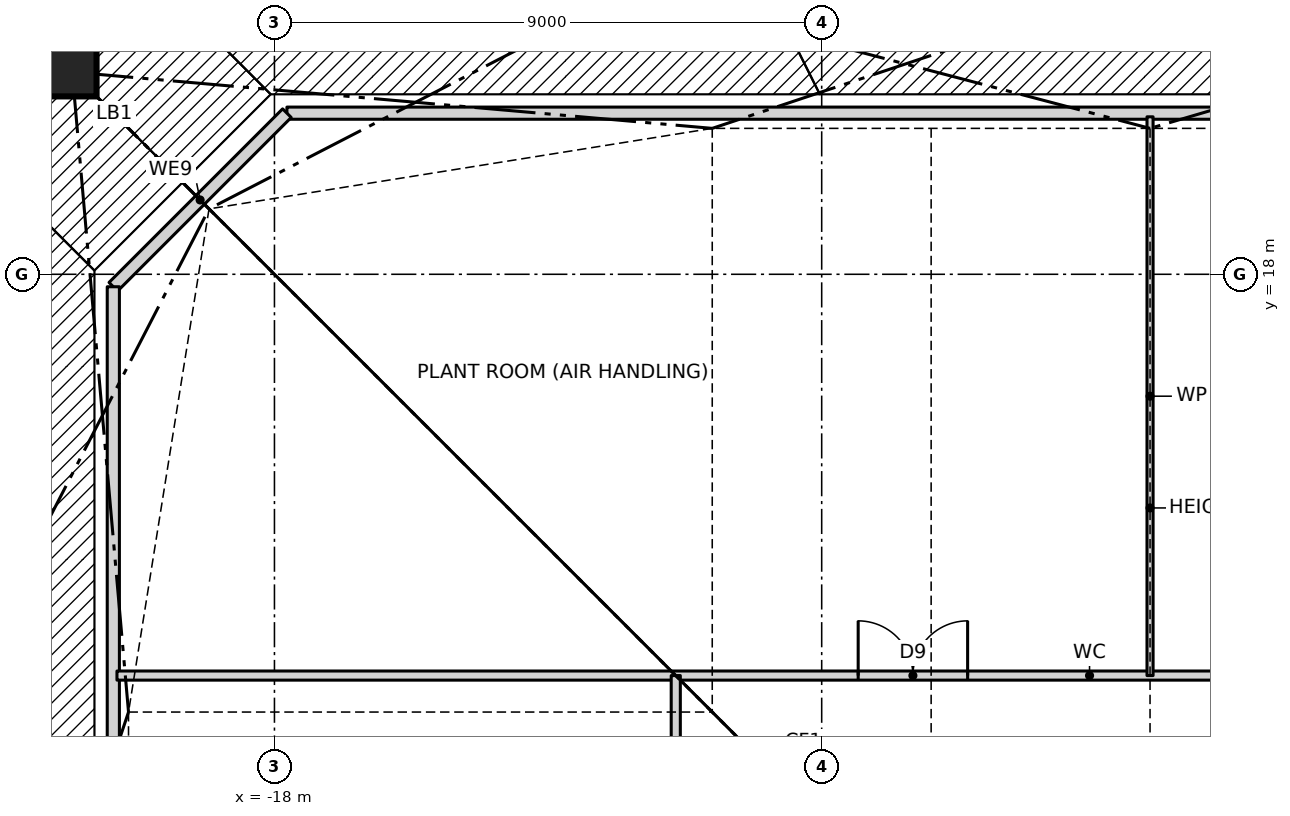
"""IFC4 building model, lengths in metres.
Left out: names, types, materials, properties, quantities, classifications, styles, units other than length and angle.
Written with IfcOpenShell. Run it as: python <this file> out.ifc"""

import sys

from ifc_helpers import new_model, si_unit, direction, frame, frame_2d, origin, origin_2d, place, context, subcontext, project, spatial, rectangle, hollow_rectangle, extrude, clip, halfspace, element, fill, save


model = new_model("IFC4")
c1 = context("Model", 3, precision=1e-05, world=origin(), true_north=direction((0.0, 1.0)))
c2 = subcontext(c1, "Body", "Model", "MODEL_VIEW")
j1 = project(units=[si_unit("LENGTHUNIT", "METRE"), si_unit("PLANEANGLEUNIT", "RADIAN")], contexts=[c1])
p1 = place(None, origin())
s1 = spatial("IfcSite", under=j1, at=p1, CompositionType="ELEMENT")
p2 = place(p1, origin())
s2 = spatial("IfcBuilding", under=s1, at=p2, CompositionType="ELEMENT")
p3 = place(p2, frame((0.0, 0.0, 74.5)))
s3 = spatial("IfcBuildingStorey", under=s2, at=p3, CompositionType="ELEMENT", Elevation=74.5)
p4 = place(p3, frame((-4.05, 22.65, 0.0), z_axis=(0.070044605522, -0.350261033367, 0.934029422311), x_axis=(0.980584767795, 0.196095673508, 0.0)))
e1 = element("IfcColumn", 1, at=p4, inside=s3, PredefinedType="COLUMN", context=c2, shape_type="Clipping", body=[
    clip(clip(extrude(hollow_rectangle(XDim=0.8, YDim=0.8, WallThickness=0.09, at=origin_2d()), origin(), (0.0, 0.0, 1.0), 6.424), halfspace(frame((0.0, 0.0, 0.0), z_axis=(0.0, -0.357196078167, -0.934029422311), x_axis=(0.980584767795, -0.183159128644, 0.070044605522)), False)), halfspace(frame((0.0, 2.143, 5.604), z_axis=(0.0, 0.357196078167, 0.934029422311), x_axis=(0.980584767795, -0.183159128644, 0.070044605522)), False)),
])
p5 = place(p3, frame((-12.15, 22.65, 0.0), z_axis=(0.206127500627, -0.343583115532, 0.91622164142), x_axis=(0.857517554715, 0.514454704863, 0.0)))
e2 = element("IfcColumn", 2, at=p5, inside=s3, PredefinedType="COLUMN", context=c2, shape_type="Clipping", body=[
    clip(clip(extrude(hollow_rectangle(XDim=0.8, YDim=0.8, WallThickness=0.09, at=origin_2d()), origin(), (0.0, 0.0, 1.0), 6.549), halfspace(frame((0.0, 0.0, 0.0), z_axis=(0.0, -0.400671815572, -0.91622164142), x_axis=(0.857517554715, -0.471354534126, 0.206127500627)), False)), halfspace(frame((0.0, 2.404, 5.497), z_axis=(0.0, 0.400671815572, 0.91622164142), x_axis=(0.857517554715, -0.471354534126, 0.206127500627)), False)),
])
p6 = place(p3, frame((-21.326, 21.326, 0.0), z_axis=(0.331294578225, -0.331294578225, 0.883452208599), x_axis=(0.707106781187, 0.707106781187, 0.0)))
e3 = element("IfcColumn", 3, at=p6, inside=s3, PredefinedType="COLUMN", context=c2, shape_type="Clipping", body=[
    clip(clip(extrude(hollow_rectangle(XDim=0.8, YDim=0.8, WallThickness=0.18, at=origin_2d()), origin(), (0.0, 0.0, 1.0), 6.792), halfspace(frame((0.0, 0.0, 0.0), z_axis=(0.0, -0.468521285666, -0.883452208599), x_axis=(0.707106781187, -0.624695047554, 0.331294578225)), False)), halfspace(frame((0.0, 2.811, 5.301), z_axis=(0.0, 0.468521285666, 0.883452208599), x_axis=(0.707106781187, -0.624695047554, 0.331294578225)), False)),
])
p7 = place(p3, frame((-22.65, 12.15, 0.0), z_axis=(0.343583115532, -0.206127500627, 0.91622164142), x_axis=(0.514454704863, 0.857517554715, 0.0)))
e4 = element("IfcColumn", 4, at=p7, inside=s3, PredefinedType="COLUMN", context=c2, shape_type="Clipping", body=[
    clip(clip(extrude(hollow_rectangle(XDim=0.8, YDim=0.8, WallThickness=0.09, at=origin_2d()), origin(), (0.0, 0.0, 1.0), 6.549), halfspace(frame((0.0, 0.0, 0.0), z_axis=(0.0, -0.400671815572, -0.91622164142), x_axis=(0.514454704863, -0.785676141527, 0.343583115532)), False)), halfspace(frame((0.0, 2.404, 5.497), z_axis=(0.0, 0.400671815572, 0.91622164142), x_axis=(0.514454704863, -0.785676141527, 0.343583115532)), False)),
])
p8 = place(p3, frame((17.795, 20.65, 0.0), z_axis=(0.0, 0.0, 1.0), x_axis=(-1.0, 0.0, 0.0)))
e5 = element("IfcWall", 5, at=p8, inside=s3, PredefinedType="PARTITIONING", context=c2, shape_type="SweptSolid", body=[
    extrude(rectangle(XDim=35.59, YDim=0.2, at=frame_2d((17.795, 0.0))), origin(), (0.0, 0.0, 1.0), 5.7),
])
p9 = place(p3, frame((-17.795, 20.65, 0.0), z_axis=(0.0, 0.0, 1.0), x_axis=(-0.707106781187, -0.707106781187, 0.0)))
e6 = element("IfcWall", 6, at=p9, inside=s3, PredefinedType="PARTITIONING", context=c2, shape_type="SweptSolid", body=[
    extrude(rectangle(XDim=4.038, YDim=0.2, at=frame_2d((2.019, 0.0))), origin(), (0.0, 0.0, 1.0), 5.7),
])
p10 = place(p3, frame((-20.65, 17.795, 0.0), z_axis=(0.0, 0.0, 1.0), x_axis=(0.0, -1.0, 0.0)))
e7 = element("IfcWall", 7, at=p10, inside=s3, PredefinedType="PARTITIONING", context=c2, shape_type="SweptSolid", body=[
    extrude(rectangle(XDim=35.59, YDim=0.2, at=frame_2d((17.795, 0.0))), origin(), (0.0, 0.0, 1.0), 5.7),
])
p11 = place(p3, frame((-20.59, 11.4, 0.0), z_axis=(0.0, 0.0, 1.0), x_axis=(1.0, 0.0, 0.0)))
e8 = element("IfcWall", 8, at=p11, inside=s3, PredefinedType="PARTITIONING", context=c2, shape_type="SweptSolid", body=[
    extrude(rectangle(XDim=31.99, YDim=0.15, at=frame_2d((15.995, 0.0))), origin(), (0.0, 0.0, 1.0), 5.77),
])
p12 = place(p11, frame((27.59, 0.0, 0.0)))
e9 = element("IfcOpeningElement", 9, at=p12, cuts=e8, PredefinedType="OPENING", context=c2, shape_type="SweptSolid", body=[
    extrude(rectangle(XDim=1.8, YDim=2.1, at=frame_2d((0.9, 1.05))), frame((0.0, 0.085, 0.0), z_axis=(0.0, -1.0, 0.0), x_axis=(1.0, 0.0, 0.0)), (0.0, 0.0, 1.0), 0.17),
])
p13 = place(p11, frame((20.09, 0.0, 0.0)))
e10 = element("IfcOpeningElement", 10, at=p13, cuts=e8, PredefinedType="OPENING", context=c2, shape_type="SweptSolid", body=[
    extrude(rectangle(XDim=1.8, YDim=2.1, at=frame_2d((0.9, 1.05))), frame((0.0, 0.085, 0.0), z_axis=(0.0, -1.0, 0.0), x_axis=(1.0, 0.0, 0.0)), (0.0, 0.0, 1.0), 0.17),
])
p14 = place(p11, frame((12.19, 0.0, 0.0)))
e11 = element("IfcOpeningElement", 11, at=p14, cuts=e8, PredefinedType="OPENING", context=c2, shape_type="SweptSolid", body=[
    extrude(rectangle(XDim=1.8, YDim=2.1, at=frame_2d((0.9, 1.05))), frame((0.0, 0.085, 0.0), z_axis=(0.0, -1.0, 0.0), x_axis=(1.0, 0.0, 0.0)), (0.0, 0.0, 1.0), 0.17),
])
p15 = place(p3, frame((-3.6, 11.4, 0.0), z_axis=(0.0, 0.0, 1.0), x_axis=(0.0, 1.0, 0.0)))
e12 = element("IfcWall", 12, at=p15, inside=s3, PredefinedType="PARTITIONING", context=c2, shape_type="SweptSolid", body=[
    extrude(rectangle(XDim=9.19, YDim=0.1, at=frame_2d((4.595, 0.0))), origin(), (0.0, 0.0, 1.0), 4.843),
])
p16 = place(p3, frame((-11.4, -20.59, 0.0), z_axis=(0.0, 0.0, 1.0), x_axis=(0.0, 1.0, 0.0)))
e13 = element("IfcWall", 13, at=p16, inside=s3, PredefinedType="PARTITIONING", context=c2, shape_type="SweptSolid", body=[
    extrude(rectangle(XDim=31.99, YDim=0.15, at=frame_2d((15.995, 0.0))), origin(), (0.0, 0.0, 1.0), 5.77),
])
p17 = place(p16, frame((19.69, 0.0, 0.0)))
e14 = element("IfcOpeningElement", 14, at=p17, cuts=e13, PredefinedType="OPENING", context=c2, shape_type="SweptSolid", body=[
    extrude(rectangle(XDim=1.8, YDim=2.1, at=frame_2d((0.9, 1.05))), frame((0.0, 0.085, 0.0), z_axis=(0.0, -1.0, 0.0), x_axis=(1.0, 0.0, 0.0)), (0.0, 0.0, 1.0), 0.17),
])
p18 = place(p14, origin())
e15 = element("IfcDoor", 15, at=p18, inside=s3, OperationType="DOUBLE_DOOR_SINGLE_SWING", PredefinedType="DOOR", context=c2, shape_type="SweptSolid", body=[
    extrude(rectangle(XDim=1.8, YDim=2.1, at=frame_2d((0.9, 1.05))), frame((0.0, 0.025, 0.0), z_axis=(0.0, -1.0, 0.0), x_axis=(1.0, 0.0, 0.0)), (0.0, 0.0, 1.0), 0.05),
])
fill(e11, e15)
save(model, sys.argv[1])
